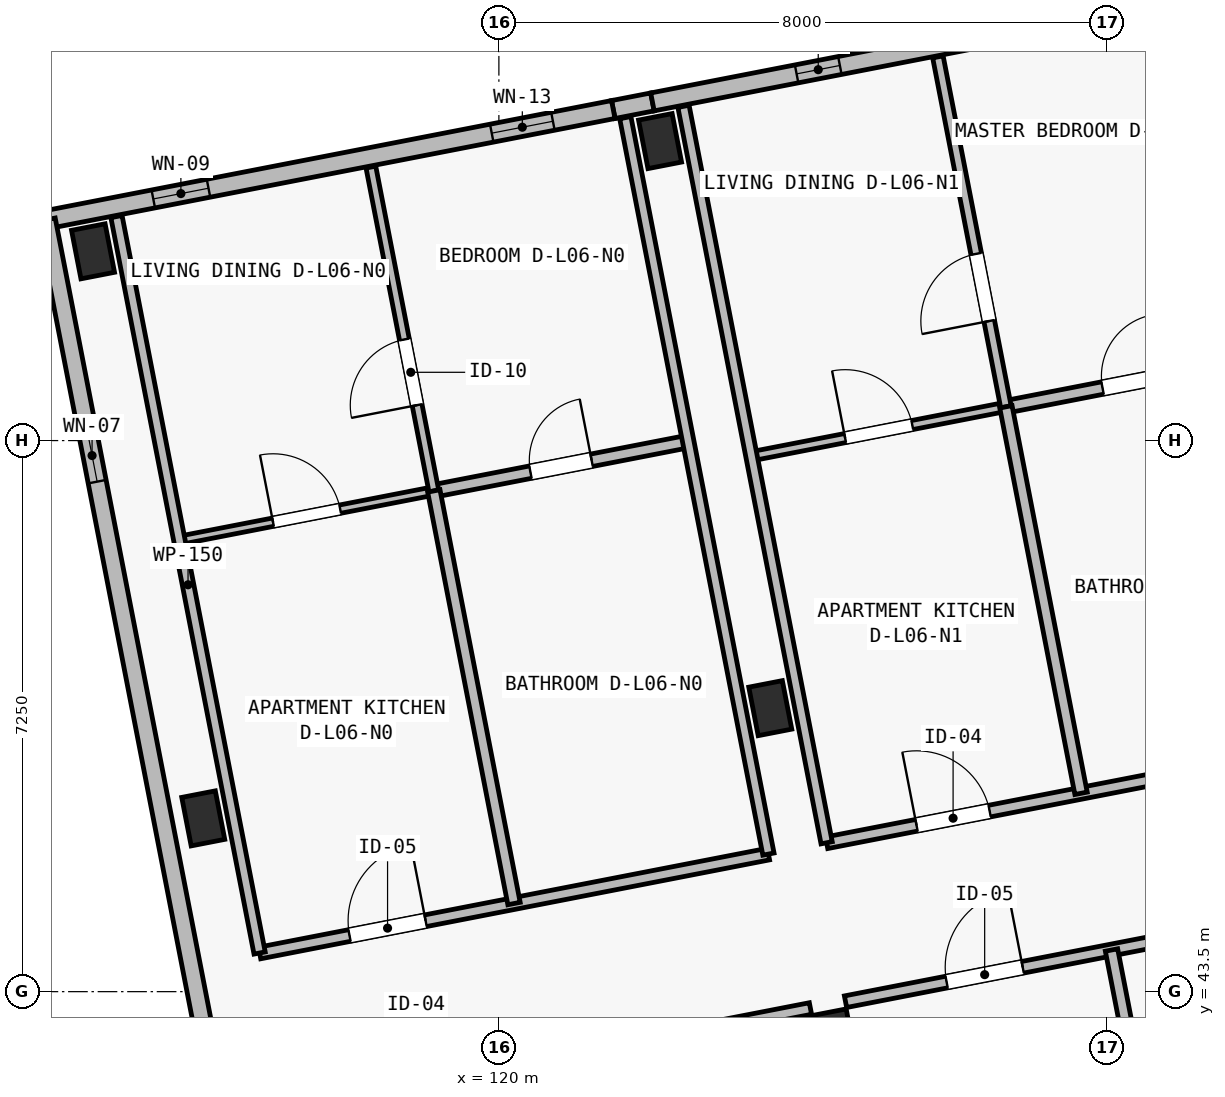
"""IFC4 building model, lengths in metres.
Left out: names, types, materials, properties, quantities, classifications, styles, units other than length and angle.
Written with IfcOpenShell. Run it as: python <this file> out.ifc"""

import sys

from ifc_helpers import new_model, si_unit, direction, frame, frame_2d, origin, origin_2d, place, context, subcontext, project, spatial, polyline, rectangle, outline, extrude, element, fill, save


model = new_model("IFC4")
c1 = context("Model", 3, precision=1e-05, world=origin(), true_north=direction((0.0, 1.0)))
c2 = subcontext(c1, "Body", "Model", "MODEL_VIEW")
j1 = project(units=[si_unit("LENGTHUNIT", "METRE"), si_unit("PLANEANGLEUNIT", "RADIAN")], contexts=[c1])
p1 = place(None, origin())
s1 = spatial("IfcSite", under=j1, at=p1, CompositionType="ELEMENT")
p2 = place(p1, origin())
s2 = spatial("IfcBuilding", under=s1, at=p2, CompositionType="ELEMENT")
p3 = place(p2, frame((0.0, 0.0, 21.4)))
s3 = spatial("IfcBuildingStorey", under=s2, at=p3, CompositionType="ELEMENT", Elevation=21.4)
for number, where, z_axis, x_axis in (
    (1, (116.11, 45.78, 0.0), (0.0, 0.0, 1.0), (0.982, 0.191, 0.0)),
    (2, (114.66, 53.24, 0.0), (0.0, 0.0, 1.0), (0.982, 0.191, 0.0)),
):
    element("IfcColumn", number, at=place(p3, frame(where, z_axis=z_axis, x_axis=x_axis)), inside=s3, PredefinedType="COLUMN", context=c2, shape_type="SweptSolid", body=[
        extrude(rectangle(XDim=0.45, YDim=0.65, at=origin_2d()), origin(), (0.0, 0.0, 1.0), 4.61),
    ])
for number, where, z_axis, x_axis in (
    (3, (124.41, 42.91, 0.0), (0.0, 0.0, 1.0), (0.982, 0.191, 0.0)),
    (4, (123.571, 47.23, 0.0), (0.0, 0.0, 1.0), (0.982, 0.191, 0.0)),
    (5, (122.121, 54.69, 0.0), (0.0, 0.0, 1.0), (0.982, 0.191, 0.0)),
):
    element("IfcColumn", number, at=place(p3, frame(where, z_axis=z_axis, x_axis=x_axis)), inside=s3, PredefinedType="COLUMN", context=c2, shape_type="SweptSolid", body=[
        extrude(rectangle(XDim=0.45, YDim=0.65, at=origin_2d()), origin(), (0.0, 0.0, 1.0), 3.25),
    ])
p4 = place(p3, frame((121.505, 55.105, 0.0), z_axis=(0.0, 0.0, 1.0), x_axis=(0.981656509867, 0.190658062077, 0.0)))
e6 = element("IfcWall", 6, at=p4, inside=s3, PredefinedType="SOLIDWALL", context=c2, shape_type="SweptSolid", body=[
    extrude(rectangle(XDim=0.525, YDim=0.24, at=frame_2d((0.262, 0.0))), origin(), (0.0, 0.0, 1.0), 3.0),
])
p5 = place(p3, frame((114.045, 53.655, 0.0), z_axis=(0.0, 0.0, 1.0), x_axis=(0.981625252578, 0.19081892857, 0.0)))
e7 = element("IfcWall", 7, at=p5, inside=s3, PredefinedType="SOLIDWALL", context=c2, shape_type="SweptSolid", body=[
    extrude(outline(polyline([(0.0, 0.0), (7.6, 0.0), (7.6, 6.659), (0.0, 5.086), (0.0, 0.0)])), frame((0.0, 0.12, 0.0), z_axis=(0.0, -1.0, 0.0), x_axis=(1.0, 0.0, 0.0)), (0.0, 0.0, 1.0), 0.24),
])
p6 = place(p5, frame((1.435, 0.0, 0.44)))
e8 = element("IfcOpeningElement", 8, at=p6, cuts=e7, PredefinedType="OPENING", context=c2, shape_type="SweptSolid", body=[
    extrude(rectangle(XDim=0.74, YDim=2.26, at=frame_2d((0.37, 1.13))), frame((0.0, 0.135, 0.0), z_axis=(0.0, -1.0, 0.0), x_axis=(1.0, 0.0, 0.0)), (0.0, 0.0, 1.0), 0.27),
])
p7 = place(p5, frame((5.971, 0.0, 0.5)))
e9 = element("IfcOpeningElement", 9, at=p7, cuts=e7, PredefinedType="OPENING", context=c2, shape_type="SweptSolid", body=[
    extrude(rectangle(XDim=0.82, YDim=2.18, at=frame_2d((0.41, 1.09))), frame((0.0, 0.135, 0.0), z_axis=(0.0, -1.0, 0.0), x_axis=(1.0, 0.0, 0.0)), (0.0, 0.0, 1.0), 0.27),
])
p8 = place(p3, frame((122.02, 55.205, 0.0), z_axis=(0.0, 0.0, 1.0), x_axis=(0.981626422232, 0.190812911449, 0.0)))
e10 = element("IfcWall", 10, at=p8, inside=s3, PredefinedType="SOLIDWALL", context=c2, shape_type="SweptSolid", body=[
    extrude(rectangle(XDim=7.6, YDim=0.24, at=frame_2d((3.8, 0.0))), origin(), (0.0, 0.0, 1.0), 3.0),
])
p9 = place(p8, frame((1.932, 0.0, 0.5)))
e11 = element("IfcOpeningElement", 11, at=p9, cuts=e10, PredefinedType="OPENING", context=c2, shape_type="SweptSolid", body=[
    extrude(rectangle(XDim=0.58, YDim=2.16, at=frame_2d((0.29, 1.08))), frame((0.0, 0.135, 0.0), z_axis=(0.0, -1.0, 0.0), x_axis=(1.0, 0.0, 0.0)), (0.0, 0.0, 1.0), 0.27),
])
p10 = place(p8, frame((5.038, 0.0, 0.44)))
e12 = element("IfcOpeningElement", 12, at=p10, cuts=e10, PredefinedType="OPENING", context=c2, shape_type="SweptSolid", body=[
    extrude(rectangle(XDim=0.66, YDim=2.32, at=frame_2d((0.33, 1.16))), frame((0.0, 0.135, 0.0), z_axis=(0.0, -1.0, 0.0), x_axis=(1.0, 0.0, 0.0)), (0.0, 0.0, 1.0), 0.27),
])
p11 = place(p3, frame((117.985, 33.385, 0.0), z_axis=(0.0, 0.0, 1.0), x_axis=(-0.190808900739, 0.981627201843, 0.0)))
e13 = element("IfcWall", 13, at=p11, inside=s3, PredefinedType="SOLIDWALL", context=c2, shape_type="SweptSolid", body=[
    extrude(rectangle(XDim=20.65, YDim=0.24, at=frame_2d((10.325, 0.0))), origin(), (0.0, 0.0, 1.0), 5.086),
])
p12 = place(p11, frame((2.81, 0.0, 0.45)))
e14 = element("IfcOpeningElement", 14, at=p12, cuts=e13, PredefinedType="OPENING", context=c2, shape_type="SweptSolid", body=[
    extrude(rectangle(XDim=0.86, YDim=2.36, at=frame_2d((0.43, 1.18))), frame((0.0, 0.135, 0.0), z_axis=(0.0, -1.0, 0.0), x_axis=(1.0, 0.0, 0.0)), (0.0, 0.0, 1.0), 0.27),
])
p13 = place(p11, frame((17.14, 0.0, 0.52)))
e15 = element("IfcOpeningElement", 15, at=p13, cuts=e13, PredefinedType="OPENING", context=c2, shape_type="SweptSolid", body=[
    extrude(rectangle(XDim=0.7, YDim=2.36, at=frame_2d((0.35, 1.18))), frame((0.0, 0.135, 0.0), z_axis=(0.0, -1.0, 0.0), x_axis=(1.0, 0.0, 0.0)), (0.0, 0.0, 1.0), 0.27),
])
p14 = place(p3, frame((116.482, 41.797, 0.0), z_axis=(0.0, 0.0, 1.0), x_axis=(0.981626358594, 0.190813238834, 0.0)))
e16 = element("IfcWall", 16, at=p14, inside=s3, PredefinedType="PARTITIONING", context=c2, shape_type="SweptSolid", body=[
    extrude(rectangle(XDim=7.76, YDim=0.155, at=frame_2d((3.88, 0.0))), origin(), (0.0, 0.0, 1.0), 2.97),
])
p15 = place(p14, frame((1.985, 0.0, 0.0)))
e17 = element("IfcOpeningElement", 17, at=p15, cuts=e16, PredefinedType="OPENING", context=c2, shape_type="SweptSolid", body=[
    extrude(rectangle(XDim=0.98, YDim=2.15, at=frame_2d((0.49, 1.075))), frame((0.0, 0.093, 0.0), z_axis=(0.0, -1.0, 0.0), x_axis=(1.0, 0.0, 0.0)), (0.0, 0.0, 1.0), 0.185),
])
p16 = place(p3, frame((124.561, 43.368, 0.0), z_axis=(0.0, 0.0, 1.0), x_axis=(0.981630356092, 0.190792672811, 0.0)))
e18 = element("IfcWall", 18, at=p16, inside=s3, PredefinedType="PARTITIONING", context=c2, shape_type="SweptSolid", body=[
    extrude(rectangle(XDim=7.13, YDim=0.155, at=frame_2d((3.565, 0.0))), origin(), (0.0, 0.0, 1.0), 2.97),
])
p17 = place(p16, frame((1.355, 0.0, 0.0)))
e19 = element("IfcOpeningElement", 19, at=p17, cuts=e18, PredefinedType="OPENING", context=c2, shape_type="SweptSolid", body=[
    extrude(rectangle(XDim=1.02, YDim=2.2, at=frame_2d((0.51, 1.1))), frame((0.0, 0.093, 0.0), z_axis=(0.0, -1.0, 0.0), x_axis=(1.0, 0.0, 0.0)), (0.0, 0.0, 1.0), 0.185),
])
p18 = place(p3, frame((128.741, 40.543, 0.0), z_axis=(0.0, 0.0, 1.0), x_axis=(-0.190800102044, 0.981628912095, 0.0)))
e20 = element("IfcWall", 20, at=p18, inside=s3, PredefinedType="PLUMBINGWALL", context=c2, shape_type="SweptSolid", body=[
    extrude(rectangle(XDim=3.57, YDim=0.165, at=frame_2d((1.785, 0.0))), origin(), (0.0, 0.0, 1.0), 2.97),
])
p19 = place(p3, frame((116.852, 44.009, 0.0), z_axis=(0.0, 0.0, 1.0), x_axis=(0.981629173664, 0.190798756314, 0.0)))
e21 = element("IfcWall", 21, at=p19, inside=s3, PredefinedType="PARTITIONING", context=c2, shape_type="SweptSolid", body=[
    extrude(rectangle(XDim=6.82, YDim=0.155, at=frame_2d((3.41, 0.0))), origin(), (0.0, 0.0, 1.0), 2.97),
])
p20 = place(p19, frame((1.205, 0.0, 0.0)))
e22 = element("IfcOpeningElement", 22, at=p20, cuts=e21, PredefinedType="OPENING", context=c2, shape_type="SweptSolid", body=[
    extrude(rectangle(XDim=1.02, YDim=2.2, at=frame_2d((0.51, 1.1))), frame((0.0, 0.093, 0.0), z_axis=(0.0, -1.0, 0.0), x_axis=(1.0, 0.0, 0.0)), (0.0, 0.0, 1.0), 0.185),
])
p21 = place(p3, frame((115.797, 49.437, 0.0), z_axis=(0.0, 0.0, 1.0), x_axis=(0.981615762271, 0.19086774285, 0.0)))
e23 = element("IfcWall", 23, at=p21, inside=s3, PredefinedType="PARTITIONING", context=c2, shape_type="SweptSolid", body=[
    extrude(rectangle(XDim=3.41, YDim=0.11, at=frame_2d((1.705, 0.0))), origin(), (0.0, 0.0, 1.0), 2.97),
])
p22 = place(p21, frame((1.255, 0.0, 0.0)))
e24 = element("IfcOpeningElement", 24, at=p22, cuts=e23, PredefinedType="OPENING", context=c2, shape_type="SweptSolid", body=[
    extrude(rectangle(XDim=0.9, YDim=2.1, at=frame_2d((0.45, 1.05))), frame((0.0, 0.07, 0.0), z_axis=(0.0, -1.0, 0.0), x_axis=(1.0, 0.0, 0.0)), (0.0, 0.0, 1.0), 0.14),
])
p23 = place(p3, frame((119.144, 50.088, 0.0), z_axis=(0.0, 0.0, 1.0), x_axis=(0.981629173664, 0.190798756314, 0.0)))
e25 = element("IfcWall", 25, at=p23, inside=s3, PredefinedType="PLUMBINGWALL", context=c2, shape_type="SweptSolid", body=[
    extrude(rectangle(XDim=3.41, YDim=0.165, at=frame_2d((1.705, 0.0))), origin(), (0.0, 0.0, 1.0), 2.97),
])
p24 = place(p23, frame((1.295, 0.0, 0.0)))
e26 = element("IfcOpeningElement", 26, at=p24, cuts=e25, PredefinedType="OPENING", context=c2, shape_type="SweptSolid", body=[
    extrude(rectangle(XDim=0.82, YDim=2.08, at=frame_2d((0.41, 1.04))), frame((0.0, 0.097, 0.0), z_axis=(0.0, -1.0, 0.0), x_axis=(1.0, 0.0, 0.0)), (0.0, 0.0, 1.0), 0.195),
])
p25 = place(p3, frame((119.144, 50.088, 0.0), z_axis=(0.0, 0.0, 1.0), x_axis=(-0.190812443151, 0.981626513262, 0.0)))
e27 = element("IfcWall", 27, at=p25, inside=s3, PredefinedType="PARTITIONING", context=c2, shape_type="SweptSolid", body=[
    extrude(rectangle(XDim=4.34, YDim=0.13, at=frame_2d((2.17, 0.0))), origin(), (0.0, 0.0, 1.0), 2.97),
])
p26 = place(p25, frame((1.15, 0.0, 0.0)))
e28 = element("IfcOpeningElement", 28, at=p26, cuts=e27, PredefinedType="OPENING", context=c2, shape_type="SweptSolid", body=[
    extrude(rectangle(XDim=0.88, YDim=2.1, at=frame_2d((0.44, 1.05))), frame((0.0, 0.08, 0.0), z_axis=(0.0, -1.0, 0.0), x_axis=(1.0, 0.0, 0.0)), (0.0, 0.0, 1.0), 0.16),
])
p27 = place(p3, frame((120.199, 44.659, 0.0), z_axis=(0.0, 0.0, 1.0), x_axis=(-0.190807031124, 0.981627565258, 0.0)))
e29 = element("IfcWall", 29, at=p27, inside=s3, PredefinedType="PLUMBINGWALL", context=c2, shape_type="SweptSolid", body=[
    extrude(rectangle(XDim=5.53, YDim=0.165, at=frame_2d((2.765, 0.0))), origin(), (0.0, 0.0, 1.0), 2.97),
])
p28 = place(p3, frame((116.852, 44.009, 0.0), z_axis=(0.0, 0.0, 1.0), x_axis=(-0.190814044018, 0.981626202078, 0.0)))
e30 = element("IfcWall", 30, at=p28, inside=s3, PredefinedType="PARTITIONING", context=c2, shape_type="SweptSolid", body=[
    extrude(rectangle(XDim=9.87, YDim=0.15, at=frame_2d((4.935, 0.0))), origin(), (0.0, 0.0, 1.0), 2.97),
])
p29 = place(p3, frame((123.547, 45.31, 0.0), z_axis=(0.0, 0.0, 1.0), x_axis=(-0.190809410863, 0.981627102685, 0.0)))
e31 = element("IfcWall", 31, at=p29, inside=s3, PredefinedType="PARTITIONING", context=c2, shape_type="SweptSolid", body=[
    extrude(rectangle(XDim=9.87, YDim=0.15, at=frame_2d((4.935, 0.0))), origin(), (0.0, 0.0, 1.0), 2.97),
])
p30 = place(p3, frame((124.312, 45.459, 0.0), z_axis=(0.0, 0.0, 1.0), x_axis=(0.981627870431, 0.190805461121, 0.0)))
e32 = element("IfcWall", 32, at=p30, inside=s3, PredefinedType="PARTITIONING", context=c2, shape_type="SweptSolid", body=[
    extrude(rectangle(XDim=6.82, YDim=0.155, at=frame_2d((3.41, 0.0))), origin(), (0.0, 0.0, 1.0), 2.97),
])
p31 = place(p30, frame((1.205, 0.0, 0.0)))
e33 = element("IfcOpeningElement", 33, at=p31, cuts=e32, PredefinedType="OPENING", context=c2, shape_type="SweptSolid", body=[
    extrude(rectangle(XDim=0.98, YDim=2.15, at=frame_2d((0.49, 1.075))), frame((0.0, 0.093, 0.0), z_axis=(0.0, -1.0, 0.0), x_axis=(1.0, 0.0, 0.0)), (0.0, 0.0, 1.0), 0.185),
])
p32 = place(p3, frame((123.324, 50.543, 0.0), z_axis=(0.0, 0.0, 1.0), x_axis=(0.981629173664, 0.190798756314, 0.0)))
e34 = element("IfcWall", 34, at=p32, inside=s3, PredefinedType="PARTITIONING", context=c2, shape_type="SweptSolid", body=[
    extrude(rectangle(XDim=3.41, YDim=0.12, at=frame_2d((1.705, 0.0))), origin(), (0.0, 0.0, 1.0), 2.97),
])
p33 = place(p32, frame((1.255, 0.0, 0.0)))
e35 = element("IfcOpeningElement", 35, at=p33, cuts=e34, PredefinedType="OPENING", context=c2, shape_type="SweptSolid", body=[
    extrude(rectangle(XDim=0.9, YDim=2.1, at=frame_2d((0.45, 1.05))), frame((0.0, 0.075, 0.0), z_axis=(0.0, -1.0, 0.0), x_axis=(1.0, 0.0, 0.0)), (0.0, 0.0, 1.0), 0.15),
])
p34 = place(p3, frame((126.671, 51.194, 0.0), z_axis=(0.0, 0.0, 1.0), x_axis=(0.981629173664, 0.190798756314, 0.0)))
e36 = element("IfcWall", 36, at=p34, inside=s3, PredefinedType="PLUMBINGWALL", context=c2, shape_type="SweptSolid", body=[
    extrude(rectangle(XDim=3.41, YDim=0.165, at=frame_2d((1.705, 0.0))), origin(), (0.0, 0.0, 1.0), 2.97),
])
p35 = place(p34, frame((1.295, 0.0, 0.0)))
e37 = element("IfcOpeningElement", 37, at=p35, cuts=e36, PredefinedType="OPENING", context=c2, shape_type="SweptSolid", body=[
    extrude(rectangle(XDim=0.82, YDim=2.08, at=frame_2d((0.41, 1.04))), frame((0.0, 0.097, 0.0), z_axis=(0.0, -1.0, 0.0), x_axis=(1.0, 0.0, 0.0)), (0.0, 0.0, 1.0), 0.195),
])
p36 = place(p3, frame((126.671, 51.194, 0.0), z_axis=(0.0, 0.0, 1.0), x_axis=(-0.190787451574, 0.981631370893, 0.0)))
e38 = element("IfcWall", 38, at=p36, inside=s3, PredefinedType="PARTITIONING", context=c2, shape_type="SweptSolid", body=[
    extrude(rectangle(XDim=4.69, YDim=0.14, at=frame_2d((2.345, 0.0))), origin(), (0.0, 0.0, 1.0), 2.97),
])
p37 = place(p36, frame((1.15, 0.0, 0.0)))
e39 = element("IfcOpeningElement", 39, at=p37, cuts=e38, PredefinedType="OPENING", context=c2, shape_type="SweptSolid", body=[
    extrude(rectangle(XDim=0.9, YDim=2.1, at=frame_2d((0.45, 1.05))), frame((0.0, 0.085, 0.0), z_axis=(0.0, -1.0, 0.0), x_axis=(1.0, 0.0, 0.0)), (0.0, 0.0, 1.0), 0.17),
])
p38 = place(p3, frame((127.66, 46.109, 0.0), z_axis=(0.0, 0.0, 1.0), x_axis=(-0.190838120755, 0.981621521599, 0.0)))
e40 = element("IfcWall", 40, at=p38, inside=s3, PredefinedType="PLUMBINGWALL", context=c2, shape_type="SweptSolid", body=[
    extrude(rectangle(XDim=5.18, YDim=0.165, at=frame_2d((2.59, 0.0))), origin(), (0.0, 0.0, 1.0), 2.97),
])
p39 = place(p3, frame((124.312, 45.459, 0.0), z_axis=(0.0, 0.0, 1.0), x_axis=(-0.190814044018, 0.981626202078, 0.0)))
e41 = element("IfcWall", 41, at=p39, inside=s3, PredefinedType="PARTITIONING", context=c2, shape_type="SweptSolid", body=[
    extrude(rectangle(XDim=9.87, YDim=0.15, at=frame_2d((4.935, 0.0))), origin(), (0.0, 0.0, 1.0), 2.97),
])
p40 = place(p6, origin())
e42 = element("IfcWindow", 42, at=p40, inside=s3, PartitioningType="SINGLE_PANEL", PredefinedType="WINDOW", context=c2, shape_type="SweptSolid", body=[
    extrude(rectangle(XDim=0.74, YDim=2.26, at=frame_2d((0.37, 1.13))), frame((0.0, 0.03, 0.0), z_axis=(0.0, -1.0, 0.0), x_axis=(1.0, 0.0, 0.0)), (0.0, 0.0, 1.0), 0.06),
])
fill(e8, e42)
p41 = place(p7, origin())
e43 = element("IfcWindow", 43, at=p41, inside=s3, PartitioningType="SINGLE_PANEL", PredefinedType="WINDOW", context=c2, shape_type="SweptSolid", body=[
    extrude(rectangle(XDim=0.82, YDim=2.18, at=frame_2d((0.41, 1.09))), frame((0.0, 0.03, 0.0), z_axis=(0.0, -1.0, 0.0), x_axis=(1.0, 0.0, 0.0)), (0.0, 0.0, 1.0), 0.06),
])
fill(e9, e43)
p42 = place(p9, origin())
e44 = element("IfcWindow", 44, at=p42, inside=s3, PartitioningType="SINGLE_PANEL", PredefinedType="WINDOW", context=c2, shape_type="SweptSolid", body=[
    extrude(rectangle(XDim=0.58, YDim=2.16, at=frame_2d((0.29, 1.08))), frame((0.0, 0.03, 0.0), z_axis=(0.0, -1.0, 0.0), x_axis=(1.0, 0.0, 0.0)), (0.0, 0.0, 1.0), 0.06),
])
fill(e11, e44)
p43 = place(p13, origin())
e45 = element("IfcWindow", 45, at=p43, inside=s3, PartitioningType="SINGLE_PANEL", PredefinedType="WINDOW", context=c2, shape_type="SweptSolid", body=[
    extrude(rectangle(XDim=0.7, YDim=2.36, at=frame_2d((0.35, 1.18))), frame((0.0, 0.03, 0.0), z_axis=(0.0, -1.0, 0.0), x_axis=(1.0, 0.0, 0.0)), (0.0, 0.0, 1.0), 0.06),
])
fill(e15, e45)
p44 = place(p17, origin())
e46 = element("IfcDoor", 46, at=p44, inside=s3, OperationType="SINGLE_SWING_RIGHT", PredefinedType="DOOR", context=c2, shape_type="SweptSolid", body=[
    extrude(rectangle(XDim=1.02, YDim=2.2, at=frame_2d((0.51, 1.1))), frame((0.0, 0.025, 0.0), z_axis=(0.0, -1.0, 0.0), x_axis=(1.0, 0.0, 0.0)), (0.0, 0.0, 1.0), 0.05),
])
fill(e19, e46)
p45 = place(p20, origin())
e47 = element("IfcDoor", 47, at=p45, inside=s3, OperationType="SINGLE_SWING_RIGHT", PredefinedType="DOOR", context=c2, shape_type="SweptSolid", body=[
    extrude(rectangle(XDim=1.02, YDim=2.2, at=frame_2d((0.51, 1.1))), frame((0.0, 0.025, 0.0), z_axis=(0.0, -1.0, 0.0), x_axis=(1.0, 0.0, 0.0)), (0.0, 0.0, 1.0), 0.05),
])
fill(e22, e47)
p46 = place(p22, origin())
e48 = element("IfcDoor", 48, at=p46, inside=s3, OperationType="SINGLE_SWING_LEFT", PredefinedType="DOOR", context=c2, shape_type="SweptSolid", body=[
    extrude(rectangle(XDim=0.9, YDim=2.1, at=frame_2d((0.45, 1.05))), frame((0.0, 0.025, 0.0), z_axis=(0.0, -1.0, 0.0), x_axis=(1.0, 0.0, 0.0)), (0.0, 0.0, 1.0), 0.05),
])
fill(e24, e48)
p47 = place(p24, origin())
e49 = element("IfcDoor", 49, at=p47, inside=s3, OperationType="SINGLE_SWING_RIGHT", PredefinedType="DOOR", context=c2, shape_type="SweptSolid", body=[
    extrude(rectangle(XDim=0.82, YDim=2.08, at=frame_2d((0.41, 1.04))), frame((0.0, 0.025, 0.0), z_axis=(0.0, -1.0, 0.0), x_axis=(1.0, 0.0, 0.0)), (0.0, 0.0, 1.0), 0.05),
])
fill(e26, e49)
p48 = place(p26, origin())
e50 = element("IfcDoor", 50, at=p48, inside=s3, OperationType="SINGLE_SWING_LEFT", PredefinedType="DOOR", context=c2, shape_type="SweptSolid", body=[
    extrude(rectangle(XDim=0.88, YDim=2.1, at=frame_2d((0.44, 1.05))), frame((0.0, 0.025, 0.0), z_axis=(0.0, -1.0, 0.0), x_axis=(1.0, 0.0, 0.0)), (0.0, 0.0, 1.0), 0.05),
])
fill(e28, e50)
p49 = place(p31, origin())
e51 = element("IfcDoor", 51, at=p49, inside=s3, OperationType="SINGLE_SWING_LEFT", PredefinedType="DOOR", context=c2, shape_type="SweptSolid", body=[
    extrude(rectangle(XDim=0.98, YDim=2.15, at=frame_2d((0.49, 1.075))), frame((0.0, 0.025, 0.0), z_axis=(0.0, -1.0, 0.0), x_axis=(1.0, 0.0, 0.0)), (0.0, 0.0, 1.0), 0.05),
])
fill(e33, e51)
p50 = place(p33, origin())
e52 = element("IfcDoor", 52, at=p50, inside=s3, OperationType="SINGLE_SWING_LEFT", PredefinedType="DOOR", context=c2, shape_type="SweptSolid", body=[
    extrude(rectangle(XDim=0.9, YDim=2.1, at=frame_2d((0.45, 1.05))), frame((0.0, 0.025, 0.0), z_axis=(0.0, -1.0, 0.0), x_axis=(1.0, 0.0, 0.0)), (0.0, 0.0, 1.0), 0.05),
])
fill(e35, e52)
p51 = place(p35, origin())
e53 = element("IfcDoor", 53, at=p51, inside=s3, OperationType="SINGLE_SWING_RIGHT", PredefinedType="DOOR", context=c2, shape_type="SweptSolid", body=[
    extrude(rectangle(XDim=0.82, YDim=2.08, at=frame_2d((0.41, 1.04))), frame((0.0, 0.025, 0.0), z_axis=(0.0, -1.0, 0.0), x_axis=(1.0, 0.0, 0.0)), (0.0, 0.0, 1.0), 0.05),
])
fill(e37, e53)
p52 = place(p37, origin())
e54 = element("IfcDoor", 54, at=p52, inside=s3, OperationType="SINGLE_SWING_LEFT", PredefinedType="DOOR", context=c2, shape_type="SweptSolid", body=[
    extrude(rectangle(XDim=0.9, YDim=2.1, at=frame_2d((0.45, 1.05))), frame((0.0, 0.025, 0.0), z_axis=(0.0, -1.0, 0.0), x_axis=(1.0, 0.0, 0.0)), (0.0, 0.0, 1.0), 0.05),
])
fill(e39, e54)
save(model, sys.argv[1])
